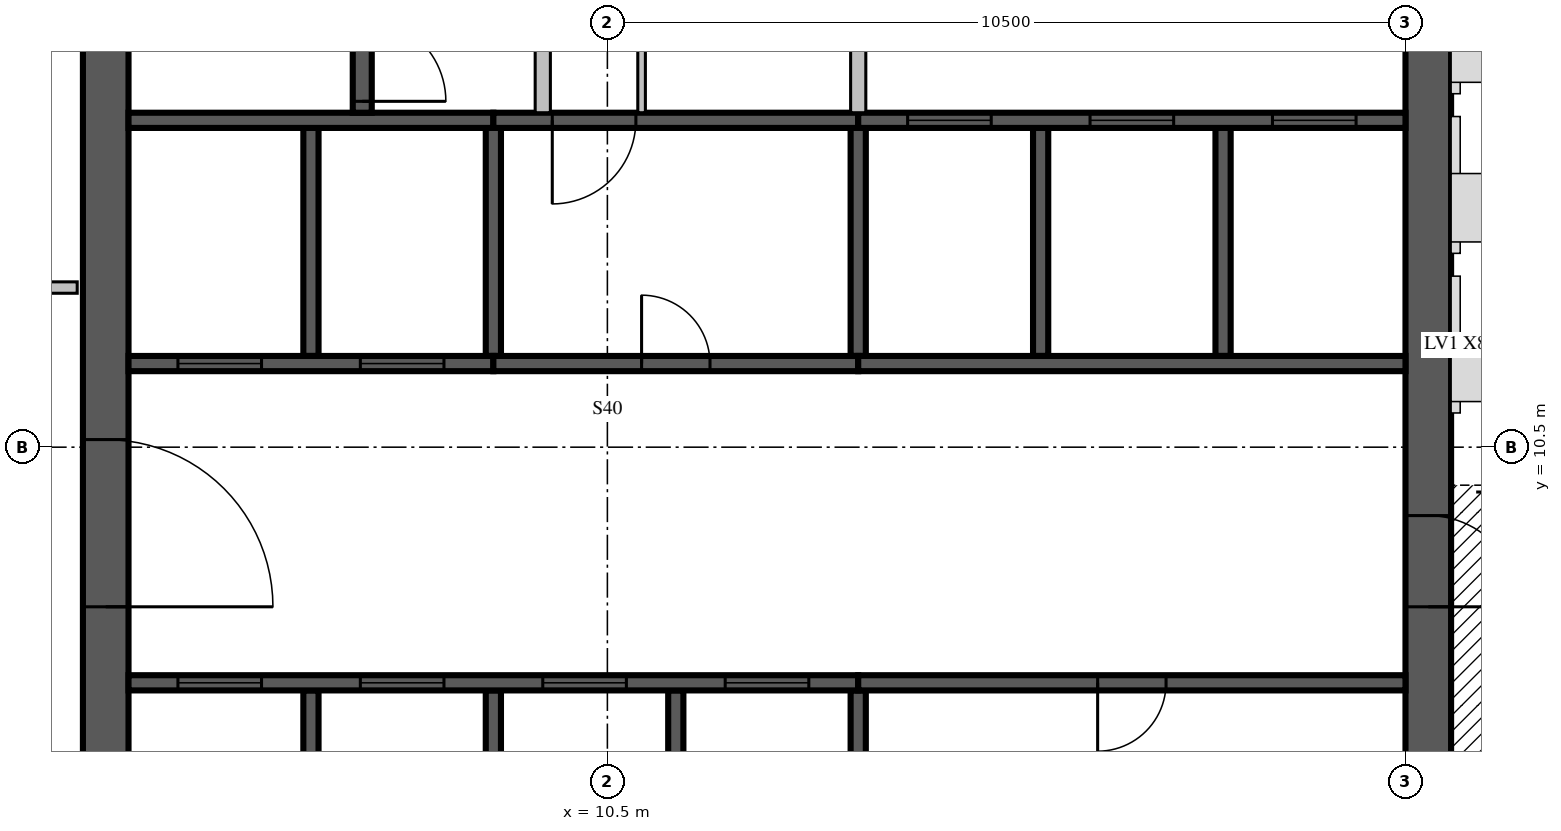
"""IFC4 building model, lengths in metres.
Left out: names, types, materials, properties, quantities, classifications, styles, units other than length and angle.
Written with IfcOpenShell. Run it as: python <this file> out.ifc"""

import sys

from ifc_helpers import new_model, si_unit, direction, frame, frame_2d, origin, place, context, subcontext, project, spatial, rectangle, extrude, source, transform, mapped, element, fill, save


model = new_model("IFC4")
c1 = context("Model", 3, precision=1e-05, world=origin(), true_north=direction((0.0, 1.0)))
c2 = subcontext(c1, "Body", "Model", "MODEL_VIEW")
j1 = project(units=[si_unit("LENGTHUNIT", "METRE"), si_unit("PLANEANGLEUNIT", "RADIAN")], contexts=[c1])
p1 = place(None, origin())
s1 = spatial("IfcSite", under=j1, at=p1, CompositionType="ELEMENT")
p2 = place(p1, origin())
s2 = spatial("IfcBuilding", under=s1, at=p2, CompositionType="ELEMENT")
p3 = place(p2, frame((0.0, 0.0, 347.5)))
s3 = spatial("IfcBuildingStorey", under=s2, at=p3, CompositionType="ELEMENT", Elevation=347.5)
m1 = source(origin(), c2, "Body", "SweptSolid", [
    extrude(rectangle(XDim=17.4, YDim=0.6, at=frame_2d((8.7, 0.0))), origin(), (0.0, 0.0, 1.0), 3.5),
])
p4 = place(p3, frame((3.9, 4.2, 0.0), z_axis=(0.0, 0.0, 1.0), x_axis=(0.0, 1.0, 0.0)))
e1 = element("IfcWall", 1, at=p4, inside=s3, PredefinedType="SHEAR", context=c2, shape_type="MappedRepresentation", body=[
    mapped(m1, transform((0.0, 0.0, 0.0), scale=1.0)),
])
m2 = source(origin(), c2, "Body", "SweptSolid", [
    extrude(rectangle(XDim=2.2, YDim=2.1, at=frame_2d((1.1, 1.05))), frame((0.0, 0.31, 0.0), z_axis=(0.0, -1.0, 0.0), x_axis=(1.0, 0.0, 0.0)), (0.0, 0.0, 1.0), 0.62),
])
p5 = place(p4, frame((4.2, 0.0, 0.0)))
e2 = element("IfcOpeningElement", 2, at=p5, cuts=e1, PredefinedType="OPENING", context=c2, shape_type="MappedRepresentation", body=[
    mapped(m2, transform((0.0, 0.0, 0.0), scale=1.0)),
])
m3 = source(origin(), c2, "Body", "SweptSolid", [
    extrude(rectangle(XDim=16.8, YDim=0.6, at=frame_2d((8.4, 0.0))), origin(), (0.0, 0.0, 1.0), 3.5),
])
p6 = place(p3, frame((21.3, 4.2, 0.0), z_axis=(0.0, 0.0, 1.0), x_axis=(0.0, 1.0, 0.0)))
e3 = element("IfcWall", 3, at=p6, inside=s3, PredefinedType="SHEAR", context=c2, shape_type="MappedRepresentation", body=[
    mapped(m3, transform((0.0, 0.0, 0.0), scale=1.0)),
])
m4 = source(origin(), c2, "Body", "SweptSolid", [
    extrude(rectangle(XDim=1.2, YDim=2.1, at=frame_2d((0.6, 1.05))), frame((0.0, 0.31, 0.0), z_axis=(0.0, -1.0, 0.0), x_axis=(1.0, 0.0, 0.0)), (0.0, 0.0, 1.0), 0.62),
])
p7 = place(p6, frame((4.2, 0.0, 0.0)))
e4 = element("IfcOpeningElement", 4, at=p7, cuts=e3, PredefinedType="OPENING", context=c2, shape_type="MappedRepresentation", body=[
    mapped(m4, transform((0.0, 0.0, 0.0), scale=1.0)),
])
m5 = source(origin(), c2, "Body", "SweptSolid", [
    extrude(rectangle(XDim=1.2, YDim=2.4, at=frame_2d((0.6, 1.2))), frame((0.0, 0.31, 0.0), z_axis=(0.0, -1.0, 0.0), x_axis=(1.0, 0.0, 0.0)), (0.0, 0.0, 1.0), 0.62),
])
p8 = place(p6, frame((12.0, 0.0, 0.6)))
e5 = element("IfcOpeningElement", 5, at=p8, cuts=e3, PredefinedType="OPENING", context=c2, shape_type="MappedRepresentation", body=[
    mapped(m5, transform((0.0, 0.0, 0.0), scale=1.0)),
])
m6 = source(origin(), c2, "Body", "SweptSolid", [
    extrude(rectangle(XDim=3.1, YDim=0.2, at=frame_2d((1.55, 0.0))), origin(), (0.0, 0.0, 1.0), 3.5),
])
for number, where, z_axis, x_axis in (
    (6, (6.6, 4.2, 0.0), (0.0, 0.0, 1.0), (0.0, 1.0, 0.0)),
    (7, (9.0, 4.2, 0.0), (0.0, 0.0, 1.0), (0.0, 1.0, 0.0)),
    (8, (11.4, 4.2, 0.0), (0.0, 0.0, 1.0), (0.0, 1.0, 0.0)),
):
    element("IfcWall", number, at=place(p3, frame(where, z_axis=z_axis, x_axis=x_axis)), inside=s3, PredefinedType="SOLIDWALL", context=c2, shape_type="MappedRepresentation", body=[
        mapped(m6, transform((0.0, 0.0, 0.0), scale=1.0)),
    ])
m7 = source(origin(), c2, "Body", "SweptSolid", [
    extrude(rectangle(XDim=3.1, YDim=0.2, at=frame_2d((1.55, 0.0))), origin(), (0.0, 0.0, 1.0), 3.1),
])
p9 = place(p3, frame((13.8, 4.2, 0.0), z_axis=(0.0, 0.0, 1.0), x_axis=(0.0, 1.0, 0.0)))
e9 = element("IfcWall", 9, at=p9, inside=s3, PredefinedType="SOLIDWALL", context=c2, shape_type="MappedRepresentation", body=[
    mapped(m7, transform((0.0, 0.0, 0.0), scale=1.0)),
])
m8 = source(origin(), c2, "Body", "SweptSolid", [
    extrude(rectangle(XDim=3.0, YDim=0.2, at=frame_2d((1.5, 0.0))), origin(), (0.0, 0.0, 1.0), 3.5),
])
p10 = place(p3, frame((6.6, 11.7, 0.0), z_axis=(0.0, 0.0, 1.0), x_axis=(0.0, 1.0, 0.0)))
e10 = element("IfcWall", 10, at=p10, inside=s3, PredefinedType="SOLIDWALL", context=c2, shape_type="MappedRepresentation", body=[
    mapped(m8, transform((0.0, 0.0, 0.0), scale=1.0)),
])
m9 = source(origin(), c2, "Body", "SweptSolid", [
    extrude(rectangle(XDim=3.0, YDim=0.2, at=frame_2d((1.5, 0.0))), origin(), (0.0, 0.0, 1.0), 3.1),
])
for number, where, z_axis, x_axis in (
    (11, (9.0, 11.7, 0.0), (0.0, 0.0, 1.0), (0.0, 1.0, 0.0)),
    (12, (13.8, 11.7, 0.0), (0.0, 0.0, 1.0), (0.0, 1.0, 0.0)),
):
    element("IfcWall", number, at=place(p3, frame(where, z_axis=z_axis, x_axis=x_axis)), inside=s3, PredefinedType="SOLIDWALL", context=c2, shape_type="MappedRepresentation", body=[
        mapped(m9, transform((0.0, 0.0, 0.0), scale=1.0)),
    ])
for number, where, z_axis, x_axis in (
    (13, (16.2, 11.7, 0.0), (0.0, 0.0, 1.0), (0.0, 1.0, 0.0)),
    (14, (18.6, 11.7, 0.0), (0.0, 0.0, 1.0), (0.0, 1.0, 0.0)),
):
    element("IfcWall", number, at=place(p3, frame(where, z_axis=z_axis, x_axis=x_axis)), inside=s3, PredefinedType="SOLIDWALL", context=c2, shape_type="MappedRepresentation", body=[
        mapped(m8, transform((0.0, 0.0, 0.0), scale=1.0)),
    ])
m10 = source(origin(), c2, "Body", "SweptSolid", [
    extrude(rectangle(XDim=9.6, YDim=0.2, at=frame_2d((4.8, 0.0))), origin(), (0.0, 0.0, 1.0), 3.5),
])
p11 = place(p3, frame((4.2, 7.4, 0.0), z_axis=(0.0, 0.0, 1.0), x_axis=(1.0, 0.0, 0.0)))
e15 = element("IfcWall", 15, at=p11, inside=s3, PredefinedType="SOLIDWALL", context=c2, shape_type="MappedRepresentation", body=[
    mapped(m10, transform((0.0, 0.0, 0.0), scale=1.0)),
])
m11 = source(origin(), c2, "Body", "SweptSolid", [
    extrude(rectangle(XDim=1.1, YDim=2.1, at=frame_2d((0.55, 1.05))), frame((0.0, 0.11, 0.0), z_axis=(0.0, -1.0, 0.0), x_axis=(1.0, 0.0, 0.0)), (0.0, 0.0, 1.0), 0.22),
])
p12 = place(p11, frame((0.65, 0.0, 0.0)))
e16 = element("IfcOpeningElement", 16, at=p12, cuts=e15, PredefinedType="OPENING", context=c2, shape_type="MappedRepresentation", body=[
    mapped(m11, transform((0.0, 0.0, 0.0), scale=1.0)),
])
p13 = place(p11, frame((3.05, 0.0, 0.0)))
e17 = element("IfcOpeningElement", 17, at=p13, cuts=e15, PredefinedType="OPENING", context=c2, shape_type="MappedRepresentation", body=[
    mapped(m11, transform((0.0, 0.0, 0.0), scale=1.0)),
])
p14 = place(p11, frame((5.45, 0.0, 0.0)))
e18 = element("IfcOpeningElement", 18, at=p14, cuts=e15, PredefinedType="OPENING", context=c2, shape_type="MappedRepresentation", body=[
    mapped(m11, transform((0.0, 0.0, 0.0), scale=1.0)),
])
p15 = place(p11, frame((7.85, 0.0, 0.0)))
e19 = element("IfcOpeningElement", 19, at=p15, cuts=e15, PredefinedType="OPENING", context=c2, shape_type="MappedRepresentation", body=[
    mapped(m11, transform((0.0, 0.0, 0.0), scale=1.0)),
])
m12 = source(origin(), c2, "Body", "SweptSolid", [
    extrude(rectangle(XDim=7.2, YDim=0.2, at=frame_2d((3.6, 0.0))), origin(), (0.0, 0.0, 1.0), 3.1),
])
p16 = place(p3, frame((13.8, 7.4, 0.0), z_axis=(0.0, 0.0, 1.0), x_axis=(1.0, 0.0, 0.0)))
e20 = element("IfcWall", 20, at=p16, inside=s3, PredefinedType="SOLIDWALL", context=c2, shape_type="MappedRepresentation", body=[
    mapped(m12, transform((0.0, 0.0, 0.0), scale=1.0)),
])
m13 = source(origin(), c2, "Body", "SweptSolid", [
    extrude(rectangle(XDim=0.9, YDim=2.1, at=frame_2d((0.45, 1.05))), frame((0.0, 0.11, 0.0), z_axis=(0.0, -1.0, 0.0), x_axis=(1.0, 0.0, 0.0)), (0.0, 0.0, 1.0), 0.22),
])
p17 = place(p16, frame((3.15, 0.0, 0.0)))
e21 = element("IfcOpeningElement", 21, at=p17, cuts=e20, PredefinedType="OPENING", context=c2, shape_type="MappedRepresentation", body=[
    mapped(m13, transform((0.0, 0.0, 0.0), scale=1.0)),
])
m14 = source(origin(), c2, "Body", "SweptSolid", [
    extrude(rectangle(XDim=4.8, YDim=0.2, at=frame_2d((2.4, 0.0))), origin(), (0.0, 0.0, 1.0), 3.5),
])
p18 = place(p3, frame((4.2, 11.6, 0.0), z_axis=(0.0, 0.0, 1.0), x_axis=(1.0, 0.0, 0.0)))
e22 = element("IfcWall", 22, at=p18, inside=s3, PredefinedType="SOLIDWALL", context=c2, shape_type="MappedRepresentation", body=[
    mapped(m14, transform((0.0, 0.0, 0.0), scale=1.0)),
])
p19 = place(p18, frame((0.65, 0.0, 0.0)))
e23 = element("IfcOpeningElement", 23, at=p19, cuts=e22, PredefinedType="OPENING", context=c2, shape_type="MappedRepresentation", body=[
    mapped(m11, transform((0.0, 0.0, 0.0), scale=1.0)),
])
p20 = place(p18, frame((3.05, 0.0, 0.0)))
e24 = element("IfcOpeningElement", 24, at=p20, cuts=e22, PredefinedType="OPENING", context=c2, shape_type="MappedRepresentation", body=[
    mapped(m11, transform((0.0, 0.0, 0.0), scale=1.0)),
])
m15 = source(origin(), c2, "Body", "SweptSolid", [
    extrude(rectangle(XDim=4.8, YDim=0.2, at=frame_2d((2.4, 0.0))), origin(), (0.0, 0.0, 1.0), 3.1),
])
p21 = place(p3, frame((9.0, 11.6, 0.0), z_axis=(0.0, 0.0, 1.0), x_axis=(1.0, 0.0, 0.0)))
e25 = element("IfcWall", 25, at=p21, inside=s3, PredefinedType="SOLIDWALL", context=c2, shape_type="MappedRepresentation", body=[
    mapped(m15, transform((0.0, 0.0, 0.0), scale=1.0)),
])
p22 = place(p21, frame((1.95, 0.0, 0.0)))
e26 = element("IfcOpeningElement", 26, at=p22, cuts=e25, PredefinedType="OPENING", context=c2, shape_type="MappedRepresentation", body=[
    mapped(m13, transform((0.0, 0.0, 0.0), scale=1.0)),
])
m16 = source(origin(), c2, "Body", "SweptSolid", [
    extrude(rectangle(XDim=7.2, YDim=0.2, at=frame_2d((3.6, 0.0))), origin(), (0.0, 0.0, 1.0), 3.5),
])
p23 = place(p3, frame((13.8, 11.6, 0.0), z_axis=(0.0, 0.0, 1.0), x_axis=(1.0, 0.0, 0.0)))
e27 = element("IfcWall", 27, at=p23, inside=s3, PredefinedType="SOLIDWALL", context=c2, shape_type="MappedRepresentation", body=[
    mapped(m16, transform((0.0, 0.0, 0.0), scale=1.0)),
])
p24 = place(p3, frame((4.2, 14.8, 0.0), z_axis=(0.0, 0.0, 1.0), x_axis=(1.0, 0.0, 0.0)))
e28 = element("IfcWall", 28, at=p24, inside=s3, PredefinedType="SOLIDWALL", context=c2, shape_type="MappedRepresentation", body=[
    mapped(m14, transform((0.0, 0.0, 0.0), scale=1.0)),
])
p25 = place(p3, frame((9.0, 14.8, 0.0), z_axis=(0.0, 0.0, 1.0), x_axis=(1.0, 0.0, 0.0)))
e29 = element("IfcWall", 29, at=p25, inside=s3, PredefinedType="SOLIDWALL", context=c2, shape_type="MappedRepresentation", body=[
    mapped(m15, transform((0.0, 0.0, 0.0), scale=1.0)),
])
p26 = place(p25, frame((0.775, 0.0, 0.0)))
e30 = element("IfcOpeningElement", 30, at=p26, cuts=e29, PredefinedType="OPENING", context=c2, shape_type="MappedRepresentation", body=[
    mapped(m11, transform((0.0, 0.0, 0.0), scale=1.0)),
])
p27 = place(p3, frame((13.8, 14.8, 0.0), z_axis=(0.0, 0.0, 1.0), x_axis=(1.0, 0.0, 0.0)))
e31 = element("IfcWall", 31, at=p27, inside=s3, PredefinedType="SOLIDWALL", context=c2, shape_type="MappedRepresentation", body=[
    mapped(m16, transform((0.0, 0.0, 0.0), scale=1.0)),
])
p28 = place(p27, frame((0.65, 0.0, 0.0)))
e32 = element("IfcOpeningElement", 32, at=p28, cuts=e31, PredefinedType="OPENING", context=c2, shape_type="MappedRepresentation", body=[
    mapped(m11, transform((0.0, 0.0, 0.0), scale=1.0)),
])
p29 = place(p27, frame((3.05, 0.0, 0.0)))
e33 = element("IfcOpeningElement", 33, at=p29, cuts=e31, PredefinedType="OPENING", context=c2, shape_type="MappedRepresentation", body=[
    mapped(m11, transform((0.0, 0.0, 0.0), scale=1.0)),
])
p30 = place(p27, frame((5.45, 0.0, 0.0)))
e34 = element("IfcOpeningElement", 34, at=p30, cuts=e31, PredefinedType="OPENING", context=c2, shape_type="MappedRepresentation", body=[
    mapped(m11, transform((0.0, 0.0, 0.0), scale=1.0)),
])
m17 = source(origin(), c2, "Body", "SweptSolid", [
    extrude(rectangle(XDim=6.6, YDim=0.25, at=frame_2d((3.3, 0.0))), origin(), (0.0, 0.0, 1.0), 3.1),
])
p31 = place(p3, frame((7.275, 14.9, 0.0), z_axis=(0.0, 0.0, 1.0), x_axis=(0.0, 1.0, 0.0)))
e35 = element("IfcWall", 35, at=p31, inside=s3, PredefinedType="SOLIDWALL", context=c2, shape_type="MappedRepresentation", body=[
    mapped(m17, transform((0.0, 0.0, 0.0), scale=1.0)),
])
m18 = source(origin(), c2, "Body", "SweptSolid", [
    extrude(rectangle(XDim=1.1, YDim=2.1, at=frame_2d((0.55, 1.05))), frame((0.0, 0.135, 0.0), z_axis=(0.0, -1.0, 0.0), x_axis=(1.0, 0.0, 0.0)), (0.0, 0.0, 1.0), 0.27),
])
p32 = place(p31, frame((0.15, 0.0, 0.0)))
e36 = element("IfcOpeningElement", 36, at=p32, cuts=e35, PredefinedType="OPENING", context=c2, shape_type="MappedRepresentation", body=[
    mapped(m18, transform((0.0, 0.0, 0.0), scale=1.0)),
])
m19 = source(origin(), c2, "Body", "SweptSolid", [
    extrude(rectangle(XDim=3.0, YDim=0.2, at=frame_2d((1.5, 0.0))), origin(), (0.0, 0.0, 1.0), 3.1),
])
for number, where, z_axis, x_axis in (
    (37, (9.65, 14.9, 0.0), (0.0, 0.0, 1.0), (0.0, 1.0, 0.0)),
    (38, (13.8, 14.9, 0.0), (0.0, 0.0, 1.0), (0.0, 1.0, 0.0)),
):
    element("IfcWall", number, at=place(p3, frame(where, z_axis=z_axis, x_axis=x_axis)), inside=s3, PredefinedType="PARTITIONING", context=c2, shape_type="MappedRepresentation", body=[
        mapped(m19, transform((0.0, 0.0, 0.0), scale=1.0)),
    ])
m20 = source(origin(), c2, "Body", "SweptSolid", [
    extrude(rectangle(XDim=3.0, YDim=0.1, at=frame_2d((1.5, 0.0))), origin(), (0.0, 0.0, 1.0), 3.1),
])
p33 = place(p3, frame((10.95, 14.9, 0.0), z_axis=(0.0, 0.0, 1.0), x_axis=(0.0, 1.0, 0.0)))
e39 = element("IfcWall", 39, at=p33, inside=s3, PredefinedType="PARTITIONING", context=c2, shape_type="MappedRepresentation", body=[
    mapped(m20, transform((0.0, 0.0, 0.0), scale=1.0)),
])
m21 = source(origin(), c2, "Body", "SweptSolid", [
    extrude(rectangle(XDim=3.225, YDim=0.15, at=frame_2d((1.613, 0.0))), origin(), (0.0, 0.0, 1.0), 3.1),
])
p34 = place(p3, frame((0.3, 12.6, 0.0), z_axis=(0.0, 0.0, 1.0), x_axis=(1.0, 0.0, 0.0)))
e40 = element("IfcWall", 40, at=p34, inside=s3, PredefinedType="PARTITIONING", context=c2, shape_type="MappedRepresentation", body=[
    mapped(m21, transform((0.0, 0.0, 0.0), scale=1.0)),
])
m22 = source(origin(), c2, "Body", "SweptSolid", [
    extrude(rectangle(XDim=0.9, YDim=2.1, at=frame_2d((0.45, 1.05))), frame((0.0, 0.085, 0.0), z_axis=(0.0, -1.0, 0.0), x_axis=(1.0, 0.0, 0.0)), (0.0, 0.0, 1.0), 0.17),
])
p35 = place(p34, frame((1.2, 0.0, 0.0)))
e41 = element("IfcOpeningElement", 41, at=p35, cuts=e40, PredefinedType="OPENING", context=c2, shape_type="MappedRepresentation", body=[
    mapped(m22, transform((0.0, 0.0, 0.0), scale=1.0)),
])
m23 = source(origin(), c2, "Body", "SweptSolid", [
    extrude(rectangle(XDim=1.1, YDim=2.1, at=frame_2d((0.55, 1.05))), frame((0.0, 0.025, 0.0), z_axis=(0.0, -1.0, 0.0), x_axis=(1.0, 0.0, 0.0)), (0.0, 0.0, 1.0), 0.05),
])
p36 = place(p12, origin())
e42 = element("IfcDoor", 42, at=p36, inside=s3, OperationType="SLIDING_TO_LEFT", PredefinedType="DOOR", context=c2, shape_type="MappedRepresentation", body=[
    mapped(m23, transform((0.0, 0.0, 0.0), scale=1.0)),
])
fill(e16, e42)
p37 = place(p13, origin())
e43 = element("IfcDoor", 43, at=p37, inside=s3, OperationType="SLIDING_TO_LEFT", PredefinedType="DOOR", context=c2, shape_type="MappedRepresentation", body=[
    mapped(m23, transform((0.0, 0.0, 0.0), scale=1.0)),
])
fill(e17, e43)
p38 = place(p14, origin())
e44 = element("IfcDoor", 44, at=p38, inside=s3, OperationType="SLIDING_TO_LEFT", PredefinedType="DOOR", context=c2, shape_type="MappedRepresentation", body=[
    mapped(m23, transform((0.0, 0.0, 0.0), scale=1.0)),
])
fill(e18, e44)
p39 = place(p15, origin())
e45 = element("IfcDoor", 45, at=p39, inside=s3, OperationType="SLIDING_TO_LEFT", PredefinedType="DOOR", context=c2, shape_type="MappedRepresentation", body=[
    mapped(m23, transform((0.0, 0.0, 0.0), scale=1.0)),
])
fill(e19, e45)
m24 = source(origin(), c2, "Body", "SweptSolid", [
    extrude(rectangle(XDim=0.9, YDim=2.1, at=frame_2d((0.45, 1.05))), frame((0.0, 0.025, 0.0), z_axis=(0.0, -1.0, 0.0), x_axis=(1.0, 0.0, 0.0)), (0.0, 0.0, 1.0), 0.05),
])
p40 = place(p17, origin())
e46 = element("IfcDoor", 46, at=p40, inside=s3, OperationType="SINGLE_SWING_RIGHT", PredefinedType="DOOR", context=c2, shape_type="MappedRepresentation", body=[
    mapped(m24, transform((0.0, 0.0, 0.0), scale=1.0)),
])
fill(e21, e46)
p41 = place(p19, origin())
e47 = element("IfcDoor", 47, at=p41, inside=s3, OperationType="SLIDING_TO_LEFT", PredefinedType="DOOR", context=c2, shape_type="MappedRepresentation", body=[
    mapped(m23, transform((0.0, 0.0, 0.0), scale=1.0)),
])
fill(e23, e47)
p42 = place(p20, origin())
e48 = element("IfcDoor", 48, at=p42, inside=s3, OperationType="SLIDING_TO_LEFT", PredefinedType="DOOR", context=c2, shape_type="MappedRepresentation", body=[
    mapped(m23, transform((0.0, 0.0, 0.0), scale=1.0)),
])
fill(e24, e48)
p43 = place(p22, origin())
e49 = element("IfcDoor", 49, at=p43, inside=s3, OperationType="SINGLE_SWING_LEFT", PredefinedType="DOOR", context=c2, shape_type="MappedRepresentation", body=[
    mapped(m24, transform((0.0, 0.0, 0.0), scale=1.0)),
])
fill(e26, e49)
p44 = place(p26, origin())
e50 = element("IfcDoor", 50, at=p44, inside=s3, OperationType="SINGLE_SWING_RIGHT", PredefinedType="DOOR", context=c2, shape_type="MappedRepresentation", body=[
    mapped(m23, transform((0.0, 0.0, 0.0), scale=1.0)),
])
fill(e30, e50)
p45 = place(p28, origin())
e51 = element("IfcDoor", 51, at=p45, inside=s3, OperationType="SLIDING_TO_LEFT", PredefinedType="DOOR", context=c2, shape_type="MappedRepresentation", body=[
    mapped(m23, transform((0.0, 0.0, 0.0), scale=1.0)),
])
fill(e32, e51)
p46 = place(p29, origin())
e52 = element("IfcDoor", 52, at=p46, inside=s3, OperationType="SLIDING_TO_LEFT", PredefinedType="DOOR", context=c2, shape_type="MappedRepresentation", body=[
    mapped(m23, transform((0.0, 0.0, 0.0), scale=1.0)),
])
fill(e33, e52)
p47 = place(p30, origin())
e53 = element("IfcDoor", 53, at=p47, inside=s3, OperationType="SLIDING_TO_LEFT", PredefinedType="DOOR", context=c2, shape_type="MappedRepresentation", body=[
    mapped(m23, transform((0.0, 0.0, 0.0), scale=1.0)),
])
fill(e34, e53)
p48 = place(p32, origin())
e54 = element("IfcDoor", 54, at=p48, inside=s3, OperationType="SINGLE_SWING_RIGHT", PredefinedType="DOOR", context=c2, shape_type="MappedRepresentation", body=[
    mapped(m23, transform((0.0, 0.0, 0.0), scale=1.0)),
])
fill(e36, e54)
m25 = source(origin(), c2, "Body", "SweptSolid", [
    extrude(rectangle(XDim=2.2, YDim=2.1, at=frame_2d((1.1, 1.05))), frame((0.0, 0.025, 0.0), z_axis=(0.0, -1.0, 0.0), x_axis=(1.0, 0.0, 0.0)), (0.0, 0.0, 1.0), 0.05),
])
p49 = place(p5, origin())
e55 = element("IfcDoor", 55, at=p49, inside=s3, OperationType="DOUBLE_DOOR_SINGLE_SWING", PredefinedType="DOOR", context=c2, shape_type="MappedRepresentation", body=[
    mapped(m25, transform((0.0, 0.0, 0.0), scale=1.0)),
])
fill(e2, e55)
m26 = source(origin(), c2, "Body", "SweptSolid", [
    extrude(rectangle(XDim=1.2, YDim=2.1, at=frame_2d((0.6, 1.05))), frame((0.0, 0.025, 0.0), z_axis=(0.0, -1.0, 0.0), x_axis=(1.0, 0.0, 0.0)), (0.0, 0.0, 1.0), 0.05),
])
p50 = place(p7, origin())
e56 = element("IfcDoor", 56, at=p50, inside=s3, OperationType="SINGLE_SWING_RIGHT", PredefinedType="DOOR", context=c2, shape_type="MappedRepresentation", body=[
    mapped(m26, transform((0.0, 0.0, 0.0), scale=1.0)),
])
fill(e4, e56)
save(model, sys.argv[1])
